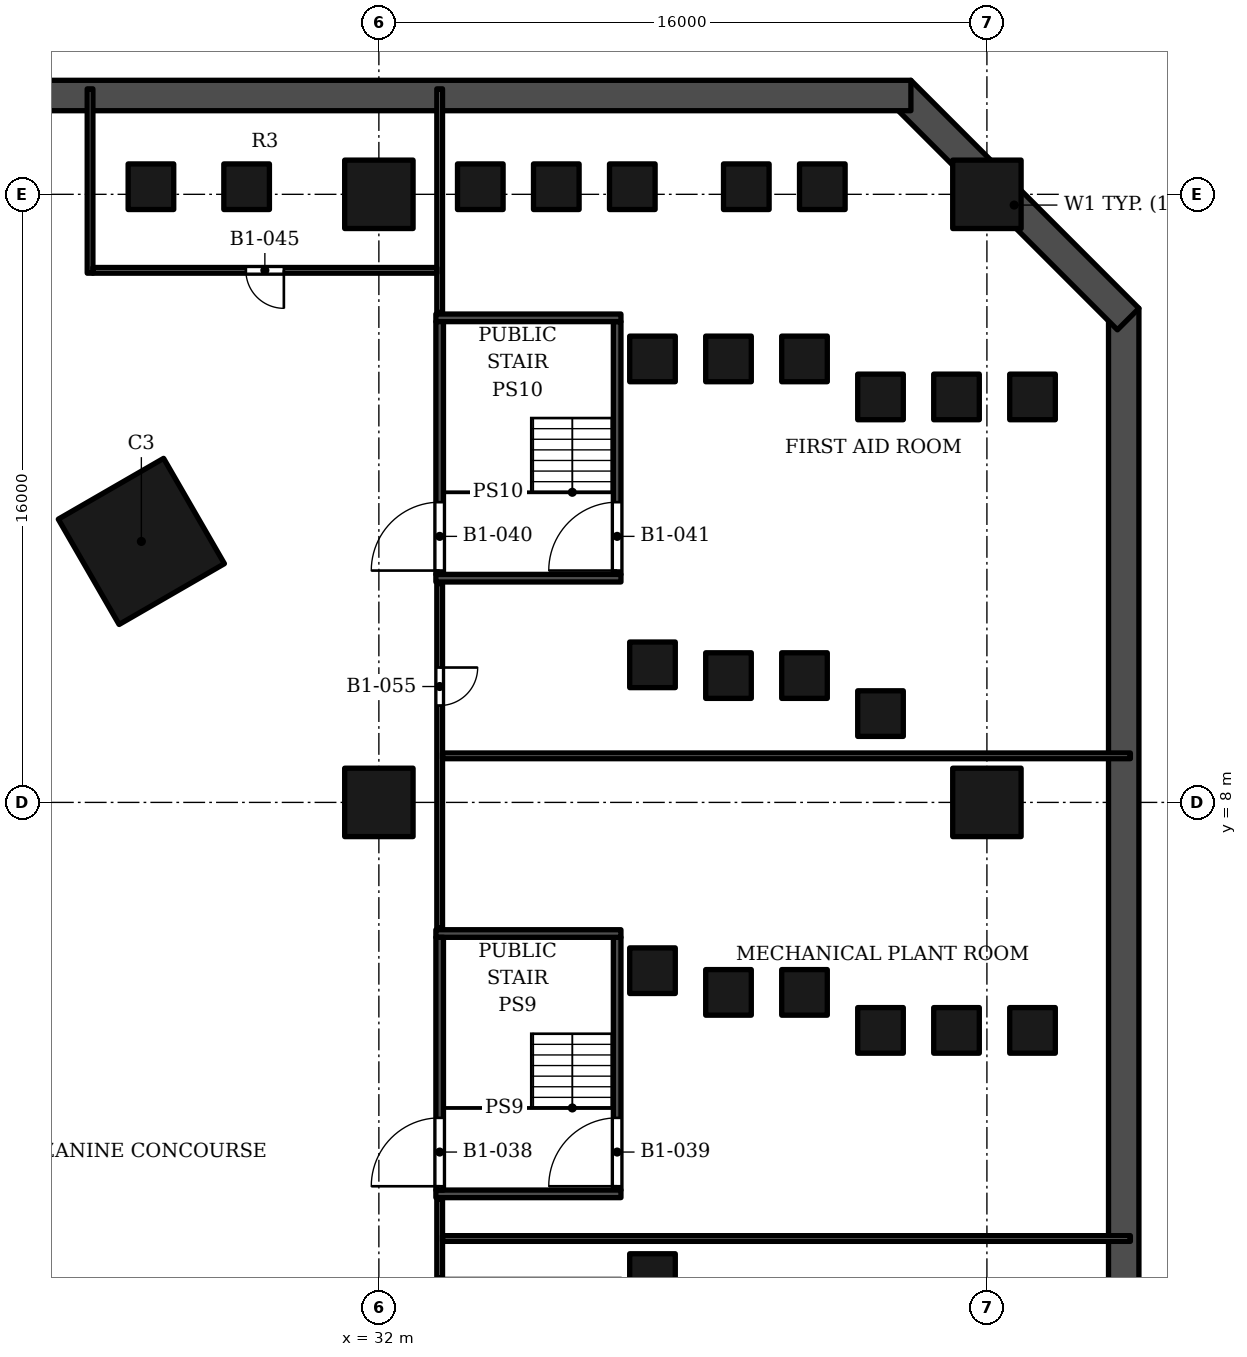
"""IFC4 building model, lengths in metres.
Left out: names, types, materials, properties, quantities, classifications, styles, units other than length and angle.
Written with IfcOpenShell. Run it as: python <this file> out.ifc"""

import sys

from ifc_helpers import new_model, si_unit, direction, frame, frame_2d, origin, origin_2d, place, context, subcontext, project, spatial, rectangle, extrude, element, fill, save


model = new_model("IFC4")
c1 = context("Model", 3, precision=1e-05, world=origin(), true_north=direction((0.0, 1.0)))
c2 = subcontext(c1, "Body", "Model", "MODEL_VIEW")
j1 = project(units=[si_unit("LENGTHUNIT", "METRE"), si_unit("PLANEANGLEUNIT", "RADIAN")], contexts=[c1])
p1 = place(None, origin())
s1 = spatial("IfcSite", under=j1, at=p1, CompositionType="ELEMENT")
p2 = place(p1, origin())
s2 = spatial("IfcBuilding", under=s1, at=p2, CompositionType="ELEMENT")
p3 = place(p2, frame((0.0, 0.0, -5.0)))
s3 = spatial("IfcBuildingStorey", under=s2, at=p3, CompositionType="ELEMENT", Elevation=-5.0)
p4 = place(p3, frame((51.6, -11.6, 0.0), z_axis=(0.0, 0.0, 1.0), x_axis=(0.0, 1.0, 0.0)))
e1 = element("IfcWall", 1, at=p4, inside=s3, PredefinedType="SHEAR", context=c2, shape_type="SweptSolid", body=[
    extrude(rectangle(XDim=32.6, YDim=0.8, at=frame_2d((16.3, 0.0))), origin(), (0.0, 0.0, 1.0), 5.0),
])
p5 = place(p3, frame((51.717, 20.717, 0.0), z_axis=(0.0, 0.0, 1.0), x_axis=(-0.707106781187, 0.707106781187, 0.0)))
e2 = element("IfcWall", 2, at=p5, inside=s3, PredefinedType="SHEAR", context=c2, shape_type="SweptSolid", body=[
    extrude(rectangle(XDim=8.485, YDim=0.8, at=frame_2d((4.243, 0.0))), origin(), (0.0, 0.0, 1.0), 5.0),
])
p6 = place(p3, frame((46.0, 26.6, 0.0), z_axis=(0.0, 0.0, 1.0), x_axis=(-1.0, 0.0, 0.0)))
e3 = element("IfcWall", 3, at=p6, inside=s3, PredefinedType="SHEAR", context=c2, shape_type="SweptSolid", body=[
    extrude(rectangle(XDim=92.0, YDim=0.8, at=frame_2d((46.0, 0.0))), origin(), (0.0, 0.0, 1.0), 5.0),
])
for number, where, z_axis, x_axis in (
    (4, (32.0, 8.0, 0.0), (0.0, 0.0, 1.0), (1.0, 0.0, 0.0)),
    (5, (32.0, 24.0, 0.0), (0.0, 0.0, 1.0), (1.0, 0.0, 0.0)),
    (6, (48.0, 8.0, 0.0), (0.0, 0.0, 1.0), (1.0, 0.0, 0.0)),
    (7, (48.0, 24.0, 0.0), (0.0, 0.0, 1.0), (1.0, 0.0, 0.0)),
):
    element("IfcColumn", number, at=place(p3, frame(where, z_axis=z_axis, x_axis=x_axis)), inside=s3, PredefinedType="COLUMN", context=c2, shape_type="SweptSolid", body=[
        extrude(rectangle(XDim=1.8, YDim=1.8, at=origin_2d()), origin(), (0.0, 0.0, 1.0), 5.0),
    ])
for number, where, z_axis, x_axis in (
    (8, (34.669, 24.2, 0.0), (0.0, 0.0, 1.0), (1.0, 0.0, 0.0)),
    (9, (39.2, 19.669, 0.0), (0.0, 0.0, 1.0), (1.0, 0.0, 0.0)),
    (10, (26.002, 24.2, 0.0), (0.0, 0.0, 1.0), (1.0, 0.0, 0.0)),
    (11, (39.2, 11.62, 0.0), (0.0, 0.0, 1.0), (1.0, 0.0, 0.0)),
    (12, (39.2, 3.572, 0.0), (0.0, 0.0, 1.0), (1.0, 0.0, 0.0)),
    (13, (39.2, -4.476, 0.0), (0.0, 0.0, 1.0), (1.0, 0.0, 0.0)),
    (14, (36.669, 24.2, 0.0), (0.0, 0.0, 1.0), (1.0, 0.0, 0.0)),
    (15, (41.2, 19.669, 0.0), (0.0, 0.0, 1.0), (1.0, 0.0, 0.0)),
    (16, (28.52, 24.2, 0.0), (0.0, 0.0, 1.0), (1.0, 0.0, 0.0)),
    (17, (41.2, 11.337, 0.0), (0.0, 0.0, 1.0), (1.0, 0.0, 0.0)),
    (18, (41.2, 3.001, 0.0), (0.0, 0.0, 1.0), (1.0, 0.0, 0.0)),
    (19, (38.669, 24.2, 0.0), (0.0, 0.0, 1.0), (1.0, 0.0, 0.0)),
    (20, (43.2, 19.669, 0.0), (0.0, 0.0, 1.0), (1.0, 0.0, 0.0)),
    (21, (43.2, 11.337, 0.0), (0.0, 0.0, 1.0), (1.0, 0.0, 0.0)),
    (22, (43.2, 3.001, 0.0), (0.0, 0.0, 1.0), (1.0, 0.0, 0.0)),
    (23, (45.2, 18.669, 0.0), (0.0, 0.0, 1.0), (1.0, 0.0, 0.0)),
    (24, (45.2, 10.337, 0.0), (0.0, 0.0, 1.0), (1.0, 0.0, 0.0)),
    (25, (45.2, 2.001, 0.0), (0.0, 0.0, 1.0), (1.0, 0.0, 0.0)),
    (26, (41.669, 24.2, 0.0), (0.0, 0.0, 1.0), (1.0, 0.0, 0.0)),
    (27, (47.2, 18.669, 0.0), (0.0, 0.0, 1.0), (1.0, 0.0, 0.0)),
    (28, (47.2, 2.001, 0.0), (0.0, 0.0, 1.0), (1.0, 0.0, 0.0)),
    (29, (43.669, 24.2, 0.0), (0.0, 0.0, 1.0), (1.0, 0.0, 0.0)),
    (30, (49.2, 18.669, 0.0), (0.0, 0.0, 1.0), (1.0, 0.0, 0.0)),
    (31, (49.2, 2.001, 0.0), (0.0, 0.0, 1.0), (1.0, 0.0, 0.0)),
):
    element("IfcColumn", number, at=place(p3, frame(where, z_axis=z_axis, x_axis=x_axis)), inside=s3, PredefinedType="COLUMN", context=c2, shape_type="SweptSolid", body=[
        extrude(rectangle(XDim=1.2, YDim=1.2, at=origin_2d()), origin(), (0.0, 0.0, 1.0), 5.0),
    ])
p7 = place(p3, frame((25.75, 14.867, 0.0), z_axis=(0.0, 0.0, 1.0), x_axis=(-0.866025386331, -0.50000003023, 0.0)))
e32 = element("IfcColumn", 32, at=p7, inside=s3, PredefinedType="COLUMN", context=c2, shape_type="SweptSolid", body=[
    extrude(rectangle(XDim=3.2, YDim=3.2, at=origin_2d()), origin(), (0.0, 0.0, 1.0), 5.0),
])
for number, where, z_axis, x_axis in (
    (33, (33.5, -2.3, 0.0), (0.0, 0.0, 1.0), (1.0, 0.0, 0.0)),
    (34, (33.5, 4.55, 0.0), (0.0, 0.0, 1.0), (1.0, 0.0, 0.0)),
):
    element("IfcWall", number, at=place(p3, frame(where, z_axis=z_axis, x_axis=x_axis)), inside=s3, PredefinedType="SOLIDWALL", context=c2, shape_type="SweptSolid", body=[
        extrude(rectangle(XDim=4.87, YDim=0.2, at=frame_2d((2.435, 0.0))), origin(), (0.0, 0.0, 1.0), 4.45),
    ])
p8 = place(p3, frame((33.6, -2.2, 0.0), z_axis=(0.0, 0.0, 1.0), x_axis=(0.0, 1.0, 0.0)))
e35 = element("IfcWall", 35, at=p8, inside=s3, PredefinedType="SOLIDWALL", context=c2, shape_type="SweptSolid", body=[
    extrude(rectangle(XDim=6.65, YDim=0.2, at=frame_2d((3.325, 0.0))), origin(), (0.0, 0.0, 1.0), 4.45),
])
p9 = place(p8, frame((0.1, 0.0, 0.0)))
e36 = element("IfcOpeningElement", 36, at=p9, cuts=e35, PredefinedType="OPENING", context=c2, shape_type="SweptSolid", body=[
    extrude(rectangle(XDim=1.8, YDim=2.4, at=frame_2d((0.9, 1.2))), frame((0.0, 0.11, 0.0), z_axis=(0.0, -1.0, 0.0), x_axis=(1.0, 0.0, 0.0)), (0.0, 0.0, 1.0), 0.22),
])
p10 = place(p3, frame((38.27, -2.2, 0.0), z_axis=(0.0, 0.0, 1.0), x_axis=(0.0, 1.0, 0.0)))
e37 = element("IfcWall", 37, at=p10, inside=s3, PredefinedType="SOLIDWALL", context=c2, shape_type="SweptSolid", body=[
    extrude(rectangle(XDim=6.65, YDim=0.2, at=frame_2d((3.325, 0.0))), origin(), (0.0, 0.0, 1.0), 4.45),
])
p11 = place(p10, frame((0.1, 0.0, 0.0)))
e38 = element("IfcOpeningElement", 38, at=p11, cuts=e37, PredefinedType="OPENING", context=c2, shape_type="SweptSolid", body=[
    extrude(rectangle(XDim=1.8, YDim=2.4, at=frame_2d((0.9, 1.2))), frame((0.0, 0.11, 0.0), z_axis=(0.0, -1.0, 0.0), x_axis=(1.0, 0.0, 0.0)), (0.0, 0.0, 1.0), 0.22),
])
for number, where, z_axis, x_axis in (
    (39, (33.5, 13.9, 0.0), (0.0, 0.0, 1.0), (1.0, 0.0, 0.0)),
    (40, (33.5, 20.75, 0.0), (0.0, 0.0, 1.0), (1.0, 0.0, 0.0)),
):
    element("IfcWall", number, at=place(p3, frame(where, z_axis=z_axis, x_axis=x_axis)), inside=s3, PredefinedType="SOLIDWALL", context=c2, shape_type="SweptSolid", body=[
        extrude(rectangle(XDim=4.87, YDim=0.2, at=frame_2d((2.435, 0.0))), origin(), (0.0, 0.0, 1.0), 4.45),
    ])
p12 = place(p3, frame((33.6, 14.0, 0.0), z_axis=(0.0, 0.0, 1.0), x_axis=(0.0, 1.0, 0.0)))
e41 = element("IfcWall", 41, at=p12, inside=s3, PredefinedType="SOLIDWALL", context=c2, shape_type="SweptSolid", body=[
    extrude(rectangle(XDim=6.65, YDim=0.2, at=frame_2d((3.325, 0.0))), origin(), (0.0, 0.0, 1.0), 4.45),
])
p13 = place(p12, frame((0.1, 0.0, 0.0)))
e42 = element("IfcOpeningElement", 42, at=p13, cuts=e41, PredefinedType="OPENING", context=c2, shape_type="SweptSolid", body=[
    extrude(rectangle(XDim=1.8, YDim=2.4, at=frame_2d((0.9, 1.2))), frame((0.0, 0.11, 0.0), z_axis=(0.0, -1.0, 0.0), x_axis=(1.0, 0.0, 0.0)), (0.0, 0.0, 1.0), 0.22),
])
p14 = place(p3, frame((38.27, 14.0, 0.0), z_axis=(0.0, 0.0, 1.0), x_axis=(0.0, 1.0, 0.0)))
e43 = element("IfcWall", 43, at=p14, inside=s3, PredefinedType="SOLIDWALL", context=c2, shape_type="SweptSolid", body=[
    extrude(rectangle(XDim=6.65, YDim=0.2, at=frame_2d((3.325, 0.0))), origin(), (0.0, 0.0, 1.0), 4.45),
])
p15 = place(p14, frame((0.1, 0.0, 0.0)))
e44 = element("IfcOpeningElement", 44, at=p15, cuts=e43, PredefinedType="OPENING", context=c2, shape_type="SweptSolid", body=[
    extrude(rectangle(XDim=1.8, YDim=2.4, at=frame_2d((0.9, 1.2))), frame((0.0, 0.11, 0.0), z_axis=(0.0, -1.0, 0.0), x_axis=(1.0, 0.0, 0.0)), (0.0, 0.0, 1.0), 0.22),
])
p16 = place(p3, frame((33.6, -4.51, 0.0), z_axis=(0.0, 0.0, 1.0), x_axis=(0.0, 1.0, 0.0)))
e45 = element("IfcWall", 45, at=p16, inside=s3, PredefinedType="PARTITIONING", context=c2, shape_type="SweptSolid", body=[
    extrude(rectangle(XDim=2.07, YDim=0.15, at=frame_2d((1.035, 0.0))), origin(), (0.0, 0.0, 1.0), 4.45),
])
p17 = place(p3, frame((33.675, -3.475, 0.0), z_axis=(0.0, 0.0, 1.0), x_axis=(1.0, 0.0, 0.0)))
e46 = element("IfcWall", 46, at=p17, inside=s3, PredefinedType="PARTITIONING", context=c2, shape_type="SweptSolid", body=[
    extrude(rectangle(XDim=18.1, YDim=0.15, at=frame_2d((9.05, 0.0))), origin(), (0.0, 0.0, 1.0), 3.55),
])
p18 = place(p3, frame((33.6, 4.69, 0.0), z_axis=(0.0, 0.0, 1.0), x_axis=(0.0, 1.0, 0.0)))
e47 = element("IfcWall", 47, at=p18, inside=s3, PredefinedType="PARTITIONING", context=c2, shape_type="SweptSolid", body=[
    extrude(rectangle(XDim=9.07, YDim=0.15, at=frame_2d((4.535, 0.0))), origin(), (0.0, 0.0, 1.0), 3.25),
])
p19 = place(p18, frame((5.859, 0.0, 0.0)))
e48 = element("IfcOpeningElement", 48, at=p19, cuts=e47, PredefinedType="OPENING", context=c2, shape_type="SweptSolid", body=[
    extrude(rectangle(XDim=1.0, YDim=2.1, at=frame_2d((0.5, 1.05))), frame((0.0, 0.085, 0.0), z_axis=(0.0, -1.0, 0.0), x_axis=(1.0, 0.0, 0.0)), (0.0, 0.0, 1.0), 0.17),
])
p20 = place(p3, frame((33.675, 9.225, 0.0), z_axis=(0.0, 0.0, 1.0), x_axis=(1.0, 0.0, 0.0)))
e49 = element("IfcWall", 49, at=p20, inside=s3, PredefinedType="PARTITIONING", context=c2, shape_type="SweptSolid", body=[
    extrude(rectangle(XDim=18.1, YDim=0.15, at=frame_2d((9.05, 0.0))), origin(), (0.0, 0.0, 1.0), 3.55),
])
p21 = place(p3, frame((33.6, 20.89, 0.0), z_axis=(0.0, 0.0, 1.0), x_axis=(0.0, 1.0, 0.0)))
e50 = element("IfcWall", 50, at=p21, inside=s3, PredefinedType="PARTITIONING", context=c2, shape_type="SweptSolid", body=[
    extrude(rectangle(XDim=5.885, YDim=0.15, at=frame_2d((2.942, 0.0))), origin(), (0.0, 0.0, 1.0), 3.55),
])
p22 = place(p3, frame((24.4, 21.925, 0.0), z_axis=(0.0, 0.0, 1.0), x_axis=(0.0, 1.0, 0.0)))
e51 = element("IfcWall", 51, at=p22, inside=s3, PredefinedType="PARTITIONING", context=c2, shape_type="SweptSolid", body=[
    extrude(rectangle(XDim=4.85, YDim=0.15, at=frame_2d((2.425, 0.0))), origin(), (0.0, 0.0, 1.0), 3.25),
])
p23 = place(p3, frame((24.475, 22.0, 0.0), z_axis=(0.0, 0.0, 1.0), x_axis=(1.0, 0.0, 0.0)))
e52 = element("IfcWall", 52, at=p23, inside=s3, PredefinedType="PARTITIONING", context=c2, shape_type="SweptSolid", body=[
    extrude(rectangle(XDim=9.05, YDim=0.15, at=frame_2d((4.525, 0.0))), origin(), (0.0, 0.0, 1.0), 3.25),
])
p24 = place(p23, frame((4.025, 0.0, 0.0)))
e53 = element("IfcOpeningElement", 53, at=p24, cuts=e52, PredefinedType="OPENING", context=c2, shape_type="SweptSolid", body=[
    extrude(rectangle(XDim=1.0, YDim=2.1, at=frame_2d((0.5, 1.05))), frame((0.0, 0.085, 0.0), z_axis=(0.0, -1.0, 0.0), x_axis=(1.0, 0.0, 0.0)), (0.0, 0.0, 1.0), 0.17),
])
p25 = place(p9, origin())
e54 = element("IfcDoor", 54, at=p25, inside=s3, OperationType="DOUBLE_DOOR_SINGLE_SWING", PredefinedType="DOOR", context=c2, shape_type="SweptSolid", body=[
    extrude(rectangle(XDim=1.8, YDim=2.4, at=frame_2d((0.9, 1.2))), frame((0.0, 0.025, 0.0), z_axis=(0.0, -1.0, 0.0), x_axis=(1.0, 0.0, 0.0)), (0.0, 0.0, 1.0), 0.05),
])
fill(e36, e54)
p26 = place(p11, origin())
e55 = element("IfcDoor", 55, at=p26, inside=s3, OperationType="DOUBLE_DOOR_SINGLE_SWING", PredefinedType="DOOR", context=c2, shape_type="SweptSolid", body=[
    extrude(rectangle(XDim=1.8, YDim=2.4, at=frame_2d((0.9, 1.2))), frame((0.0, 0.025, 0.0), z_axis=(0.0, -1.0, 0.0), x_axis=(1.0, 0.0, 0.0)), (0.0, 0.0, 1.0), 0.05),
])
fill(e38, e55)
p27 = place(p13, origin())
e56 = element("IfcDoor", 56, at=p27, inside=s3, OperationType="DOUBLE_DOOR_SINGLE_SWING", PredefinedType="DOOR", context=c2, shape_type="SweptSolid", body=[
    extrude(rectangle(XDim=1.8, YDim=2.4, at=frame_2d((0.9, 1.2))), frame((0.0, 0.025, 0.0), z_axis=(0.0, -1.0, 0.0), x_axis=(1.0, 0.0, 0.0)), (0.0, 0.0, 1.0), 0.05),
])
fill(e42, e56)
p28 = place(p15, origin())
e57 = element("IfcDoor", 57, at=p28, inside=s3, OperationType="DOUBLE_DOOR_SINGLE_SWING", PredefinedType="DOOR", context=c2, shape_type="SweptSolid", body=[
    extrude(rectangle(XDim=1.8, YDim=2.4, at=frame_2d((0.9, 1.2))), frame((0.0, 0.025, 0.0), z_axis=(0.0, -1.0, 0.0), x_axis=(1.0, 0.0, 0.0)), (0.0, 0.0, 1.0), 0.05),
])
fill(e44, e57)
p29 = place(p24, origin())
e58 = element("IfcDoor", 58, at=p29, inside=s3, OperationType="SINGLE_SWING_RIGHT", PredefinedType="DOOR", context=c2, shape_type="SweptSolid", body=[
    extrude(rectangle(XDim=1.0, YDim=2.1, at=frame_2d((0.5, 1.05))), frame((0.0, 0.025, 0.0), z_axis=(0.0, -1.0, 0.0), x_axis=(1.0, 0.0, 0.0)), (0.0, 0.0, 1.0), 0.05),
])
fill(e53, e58)
p30 = place(p19, origin())
e59 = element("IfcDoor", 59, at=p30, inside=s3, OperationType="SINGLE_SWING_RIGHT", PredefinedType="DOOR", context=c2, shape_type="SweptSolid", body=[
    extrude(rectangle(XDim=1.0, YDim=2.1, at=frame_2d((0.5, 1.05))), frame((0.0, 0.025, 0.0), z_axis=(0.0, -1.0, 0.0), x_axis=(1.0, 0.0, 0.0)), (0.0, 0.0, 1.0), 0.05),
])
fill(e48, e59)
save(model, sys.argv[1])
